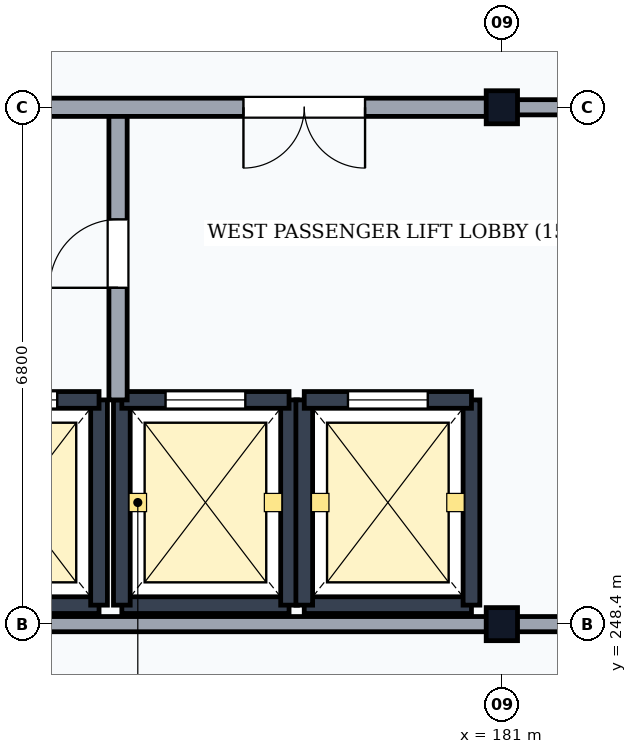
"""IFC4 building model, lengths in metres.
Left out: names, types, materials, properties, quantities, classifications, styles, units other than length and angle.
Written with IfcOpenShell. Run it as: python <this file> out.ifc"""

import sys

from ifc_helpers import new_model, si_unit, direction, frame, frame_2d, origin, origin_2d, place, context, subcontext, project, spatial, rectangle, i_section, extrude, element, fill, save


model = new_model("IFC4")
c1 = context("Model", 3, precision=1e-05, world=origin(), true_north=direction((0.0, 1.0)))
c2 = subcontext(c1, "Body", "Model", "MODEL_VIEW")
j1 = project(units=[si_unit("LENGTHUNIT", "METRE"), si_unit("PLANEANGLEUNIT", "RADIAN")], contexts=[c1])
p1 = place(None, origin())
s1 = spatial("IfcSite", under=j1, at=p1, CompositionType="ELEMENT")
p2 = place(p1, origin())
s2 = spatial("IfcBuilding", under=s1, at=p2, CompositionType="ELEMENT")
p3 = place(p2, origin())
s3 = spatial("IfcBuildingStorey", under=s2, at=p3, CompositionType="ELEMENT", Elevation=0.0)
for number, where, z_axis, x_axis in (
    (1, (181.0, 248.4, 0.0), (0.0, 0.0, 1.0), (1.0, 0.0, 0.0)),
    (2, (181.0, 255.2, 0.0), (0.0, 0.0, 1.0), (1.0, 0.0, 0.0)),
):
    element("IfcColumn", number, at=place(p3, frame(where, z_axis=z_axis, x_axis=x_axis)), inside=s3, PredefinedType="COLUMN", context=c2, shape_type="SweptSolid", body=[
        extrude(i_section(OverallWidth=0.412, OverallDepth=0.435, WebThickness=0.036, FlangeThickness=0.057, FilletRadius=0.015, at=origin_2d()), origin(), (0.0, 0.0, 1.0), 5.4),
    ])
p4 = place(p3, frame((173.5, 248.65, 0.0), z_axis=(0.0, 0.0, 1.0), x_axis=(1.0, 0.0, 0.0)))
e3 = element("IfcWall", 3, at=p4, inside=s3, PredefinedType="SHEAR", context=c2, shape_type="SweptSolid", body=[
    extrude(rectangle(XDim=2.2, YDim=0.22, at=frame_2d((1.1, 0.0))), origin(), (0.0, 0.0, 1.0), 5.14),
])
p5 = place(p3, frame((175.7, 248.65, 0.0), z_axis=(0.0, 0.0, 1.0), x_axis=(0.0, 1.0, 0.0)))
e4 = element("IfcWall", 4, at=p5, inside=s3, PredefinedType="SHEAR", context=c2, shape_type="SweptSolid", body=[
    extrude(rectangle(XDim=2.7, YDim=0.22, at=frame_2d((1.35, 0.0))), origin(), (0.0, 0.0, 1.0), 5.14),
])
p6 = place(p3, frame((173.5, 251.35, 0.0), z_axis=(0.0, 0.0, 1.0), x_axis=(1.0, 0.0, 0.0)))
e5 = element("IfcWall", 5, at=p6, inside=s3, PredefinedType="SHEAR", context=c2, shape_type="SweptSolid", body=[
    extrude(rectangle(XDim=2.2, YDim=0.22, at=frame_2d((1.1, 0.0))), origin(), (0.0, 0.0, 1.0), 5.14),
])
p7 = place(p6, frame((0.55, 0.0, 0.0)))
e6 = element("IfcOpeningElement", 6, at=p7, cuts=e5, PredefinedType="OPENING", context=c2, shape_type="SweptSolid", body=[
    extrude(rectangle(XDim=1.1, YDim=2.15, at=frame_2d((0.55, 1.075))), frame((0.0, 0.125, 0.0), z_axis=(0.0, -1.0, 0.0), x_axis=(1.0, 0.0, 0.0)), (0.0, 0.0, 1.0), 0.25),
])
p8 = place(p3, frame((176.0, 248.65, 0.0), z_axis=(0.0, 0.0, 1.0), x_axis=(1.0, 0.0, 0.0)))
e7 = element("IfcWall", 7, at=p8, inside=s3, PredefinedType="SHEAR", context=c2, shape_type="SweptSolid", body=[
    extrude(rectangle(XDim=2.2, YDim=0.22, at=frame_2d((1.1, 0.0))), origin(), (0.0, 0.0, 1.0), 5.14),
])
for number, where, z_axis, x_axis in (
    (8, (176.0, 248.65, 0.0), (0.0, 0.0, 1.0), (0.0, 1.0, 0.0)),
    (9, (178.2, 248.65, 0.0), (0.0, 0.0, 1.0), (0.0, 1.0, 0.0)),
):
    element("IfcWall", number, at=place(p3, frame(where, z_axis=z_axis, x_axis=x_axis)), inside=s3, PredefinedType="SHEAR", context=c2, shape_type="SweptSolid", body=[
        extrude(rectangle(XDim=2.7, YDim=0.22, at=frame_2d((1.35, 0.0))), origin(), (0.0, 0.0, 1.0), 5.14),
    ])
p9 = place(p3, frame((176.0, 251.35, 0.0), z_axis=(0.0, 0.0, 1.0), x_axis=(1.0, 0.0, 0.0)))
e10 = element("IfcWall", 10, at=p9, inside=s3, PredefinedType="SHEAR", context=c2, shape_type="SweptSolid", body=[
    extrude(rectangle(XDim=2.2, YDim=0.22, at=frame_2d((1.1, 0.0))), origin(), (0.0, 0.0, 1.0), 5.14),
])
p10 = place(p9, frame((0.575, 0.0, 0.0)))
e11 = element("IfcOpeningElement", 11, at=p10, cuts=e10, PredefinedType="OPENING", context=c2, shape_type="SweptSolid", body=[
    extrude(rectangle(XDim=1.05, YDim=2.15, at=frame_2d((0.525, 1.075))), frame((0.0, 0.125, 0.0), z_axis=(0.0, -1.0, 0.0), x_axis=(1.0, 0.0, 0.0)), (0.0, 0.0, 1.0), 0.25),
])
p11 = place(p3, frame((178.4, 248.65, 0.0), z_axis=(0.0, 0.0, 1.0), x_axis=(1.0, 0.0, 0.0)))
e12 = element("IfcWall", 12, at=p11, inside=s3, PredefinedType="SHEAR", context=c2, shape_type="SweptSolid", body=[
    extrude(rectangle(XDim=2.2, YDim=0.22, at=frame_2d((1.1, 0.0))), origin(), (0.0, 0.0, 1.0), 5.14),
])
for number, where, z_axis, x_axis in (
    (13, (178.4, 248.65, 0.0), (0.0, 0.0, 1.0), (0.0, 1.0, 0.0)),
    (14, (180.6, 248.65, 0.0), (0.0, 0.0, 1.0), (0.0, 1.0, 0.0)),
):
    element("IfcWall", number, at=place(p3, frame(where, z_axis=z_axis, x_axis=x_axis)), inside=s3, PredefinedType="SHEAR", context=c2, shape_type="SweptSolid", body=[
        extrude(rectangle(XDim=2.7, YDim=0.22, at=frame_2d((1.35, 0.0))), origin(), (0.0, 0.0, 1.0), 5.14),
    ])
p12 = place(p3, frame((178.4, 251.35, 0.0), z_axis=(0.0, 0.0, 1.0), x_axis=(1.0, 0.0, 0.0)))
e15 = element("IfcWall", 15, at=p12, inside=s3, PredefinedType="SHEAR", context=c2, shape_type="SweptSolid", body=[
    extrude(rectangle(XDim=2.2, YDim=0.22, at=frame_2d((1.1, 0.0))), origin(), (0.0, 0.0, 1.0), 5.14),
])
p13 = place(p12, frame((0.575, 0.0, 0.0)))
e16 = element("IfcOpeningElement", 16, at=p13, cuts=e15, PredefinedType="OPENING", context=c2, shape_type="SweptSolid", body=[
    extrude(rectangle(XDim=1.05, YDim=2.15, at=frame_2d((0.525, 1.075))), frame((0.0, 0.125, 0.0), z_axis=(0.0, -1.0, 0.0), x_axis=(1.0, 0.0, 0.0)), (0.0, 0.0, 1.0), 0.25),
])
p14 = place(p3, frame((175.95, 251.35, 0.0), z_axis=(0.0, 0.0, 1.0), x_axis=(0.0, 1.0, 0.0)))
e17 = element("IfcWall", 17, at=p14, inside=s3, PredefinedType="PARTITIONING", context=c2, shape_type="SweptSolid", body=[
    extrude(rectangle(XDim=3.85, YDim=0.24, at=frame_2d((1.925, 0.0))), origin(), (0.0, 0.0, 1.0), 5.14),
])
p15 = place(p14, frame((1.475, 0.0, 0.0)))
e18 = element("IfcOpeningElement", 18, at=p15, cuts=e17, PredefinedType="OPENING", context=c2, shape_type="SweptSolid", body=[
    extrude(rectangle(XDim=0.9, YDim=2.1, at=frame_2d((0.45, 1.05))), frame((0.0, 0.135, 0.0), z_axis=(0.0, -1.0, 0.0), x_axis=(1.0, 0.0, 0.0)), (0.0, 0.0, 1.0), 0.27),
])
p16 = place(p3, frame((181.0, 248.4, 0.0), z_axis=(0.0, 0.0, 1.0), x_axis=(1.0, 0.0, 0.0)))
e19 = element("IfcWall", 19, at=p16, inside=s3, PredefinedType="PARTITIONING", context=c2, shape_type="SweptSolid", body=[
    extrude(rectangle(XDim=8.0, YDim=0.2, at=frame_2d((4.0, 0.0))), origin(), (0.0, 0.0, 1.0), 4.638),
])
p17 = place(p3, frame((173.0, 255.2, 0.0), z_axis=(0.0, 0.0, 1.0), x_axis=(1.0, 0.0, 0.0)))
e20 = element("IfcWall", 20, at=p17, inside=s3, PredefinedType="PARTITIONING", context=c2, shape_type="SweptSolid", body=[
    extrude(rectangle(XDim=8.0, YDim=0.24, at=frame_2d((4.0, 0.0))), origin(), (0.0, 0.0, 1.0), 4.638),
])
p18 = place(p17, frame((1.05, 0.0, 0.0)))
e21 = element("IfcOpeningElement", 21, at=p18, cuts=e20, PredefinedType="OPENING", context=c2, shape_type="SweptSolid", body=[
    extrude(rectangle(XDim=1.0, YDim=2.1, at=frame_2d((0.5, 1.05))), frame((0.0, 0.135, 0.0), z_axis=(0.0, -1.0, 0.0), x_axis=(1.0, 0.0, 0.0)), (0.0, 0.0, 1.0), 0.27),
])
p19 = place(p17, frame((4.6, 0.0, 0.0)))
e22 = element("IfcOpeningElement", 22, at=p19, cuts=e20, PredefinedType="OPENING", context=c2, shape_type="SweptSolid", body=[
    extrude(rectangle(XDim=1.6, YDim=2.25, at=frame_2d((0.8, 1.125))), frame((0.0, 0.135, 0.0), z_axis=(0.0, -1.0, 0.0), x_axis=(1.0, 0.0, 0.0)), (0.0, 0.0, 1.0), 0.27),
])
p20 = place(p3, frame((181.0, 255.2, 0.0), z_axis=(0.0, 0.0, 1.0), x_axis=(1.0, 0.0, 0.0)))
e23 = element("IfcWall", 23, at=p20, inside=s3, PredefinedType="PARTITIONING", context=c2, shape_type="SweptSolid", body=[
    extrude(rectangle(XDim=8.0, YDim=0.2, at=frame_2d((4.0, 0.0))), origin(), (0.0, 0.0, 1.0), 4.638),
])
p21 = place(p20, frame((0.85, 0.0, 0.0)))
e24 = element("IfcOpeningElement", 24, at=p21, cuts=e23, PredefinedType="OPENING", context=c2, shape_type="SweptSolid", body=[
    extrude(rectangle(XDim=0.9, YDim=2.1, at=frame_2d((0.45, 1.05))), frame((0.0, 0.115, 0.0), z_axis=(0.0, -1.0, 0.0), x_axis=(1.0, 0.0, 0.0)), (0.0, 0.0, 1.0), 0.23),
])
p22 = place(p20, frame((3.25, 0.0, 0.0)))
e25 = element("IfcOpeningElement", 25, at=p22, cuts=e23, PredefinedType="OPENING", context=c2, shape_type="SweptSolid", body=[
    extrude(rectangle(XDim=0.9, YDim=2.1, at=frame_2d((0.45, 1.05))), frame((0.0, 0.115, 0.0), z_axis=(0.0, -1.0, 0.0), x_axis=(1.0, 0.0, 0.0)), (0.0, 0.0, 1.0), 0.23),
])
p23 = place(p20, frame((5.075, 0.0, 0.0)))
e26 = element("IfcOpeningElement", 26, at=p23, cuts=e23, PredefinedType="OPENING", context=c2, shape_type="SweptSolid", body=[
    extrude(rectangle(XDim=0.95, YDim=2.1, at=frame_2d((0.475, 1.05))), frame((0.0, 0.115, 0.0), z_axis=(0.0, -1.0, 0.0), x_axis=(1.0, 0.0, 0.0)), (0.0, 0.0, 1.0), 0.23),
])
p24 = place(p20, frame((6.5, 0.0, 0.0)))
e27 = element("IfcOpeningElement", 27, at=p24, cuts=e23, PredefinedType="OPENING", context=c2, shape_type="SweptSolid", body=[
    extrude(rectangle(XDim=0.85, YDim=2.1, at=frame_2d((0.425, 1.05))), frame((0.0, 0.115, 0.0), z_axis=(0.0, -1.0, 0.0), x_axis=(1.0, 0.0, 0.0)), (0.0, 0.0, 1.0), 0.23),
])
p25 = place(p3, frame((173.0, 248.4, 0.0), z_axis=(0.0, 0.0, 1.0), x_axis=(1.0, 0.0, 0.0)))
e28 = element("IfcWall", 28, at=p25, inside=s3, PredefinedType="PARTITIONING", context=c2, shape_type="SweptSolid", body=[
    extrude(rectangle(XDim=8.0, YDim=0.2, at=frame_2d((4.0, 0.0))), origin(), (0.0, 0.0, 1.0), 4.638),
])
p26 = place(p7, origin())
e29 = element("IfcDoor", 29, at=p26, inside=s3, OperationType="DOUBLE_DOOR_SLIDING", PredefinedType="USERDEFINED", context=c2, shape_type="SweptSolid", body=[
    extrude(rectangle(XDim=1.1, YDim=2.15, at=frame_2d((0.55, 1.075))), frame((0.0, 0.025, 0.0), z_axis=(0.0, -1.0, 0.0), x_axis=(1.0, 0.0, 0.0)), (0.0, 0.0, 1.0), 0.05),
])
fill(e6, e29)
p27 = place(p10, origin())
e30 = element("IfcDoor", 30, at=p27, inside=s3, OperationType="DOUBLE_DOOR_SLIDING", PredefinedType="USERDEFINED", context=c2, shape_type="SweptSolid", body=[
    extrude(rectangle(XDim=1.05, YDim=2.15, at=frame_2d((0.525, 1.075))), frame((0.0, 0.025, 0.0), z_axis=(0.0, -1.0, 0.0), x_axis=(1.0, 0.0, 0.0)), (0.0, 0.0, 1.0), 0.05),
])
fill(e11, e30)
p28 = place(p13, origin())
e31 = element("IfcDoor", 31, at=p28, inside=s3, OperationType="DOUBLE_DOOR_SLIDING", PredefinedType="USERDEFINED", context=c2, shape_type="SweptSolid", body=[
    extrude(rectangle(XDim=1.05, YDim=2.15, at=frame_2d((0.525, 1.075))), frame((0.0, 0.025, 0.0), z_axis=(0.0, -1.0, 0.0), x_axis=(1.0, 0.0, 0.0)), (0.0, 0.0, 1.0), 0.05),
])
fill(e16, e31)
p29 = place(p15, origin())
e32 = element("IfcDoor", 32, at=p29, inside=s3, OperationType="SINGLE_SWING_LEFT", PredefinedType="DOOR", context=c2, shape_type="SweptSolid", body=[
    extrude(rectangle(XDim=0.9, YDim=2.1, at=frame_2d((0.45, 1.05))), frame((0.0, 0.025, 0.0), z_axis=(0.0, -1.0, 0.0), x_axis=(1.0, 0.0, 0.0)), (0.0, 0.0, 1.0), 0.05),
])
fill(e18, e32)
p30 = place(p19, frame((1.6, 0.0, 0.0), z_axis=(0.0, 0.0, 1.0), x_axis=(-1.0, 0.0, 0.0)))
e33 = element("IfcDoor", 33, at=p30, inside=s3, OperationType="DOUBLE_DOOR_SINGLE_SWING", PredefinedType="DOOR", context=c2, shape_type="SweptSolid", body=[
    extrude(rectangle(XDim=1.6, YDim=2.25, at=frame_2d((0.8, 1.125))), frame((0.0, 0.025, 0.0), z_axis=(0.0, -1.0, 0.0), x_axis=(1.0, 0.0, 0.0)), (0.0, 0.0, 1.0), 0.05),
])
fill(e22, e33)
save(model, sys.argv[1])
